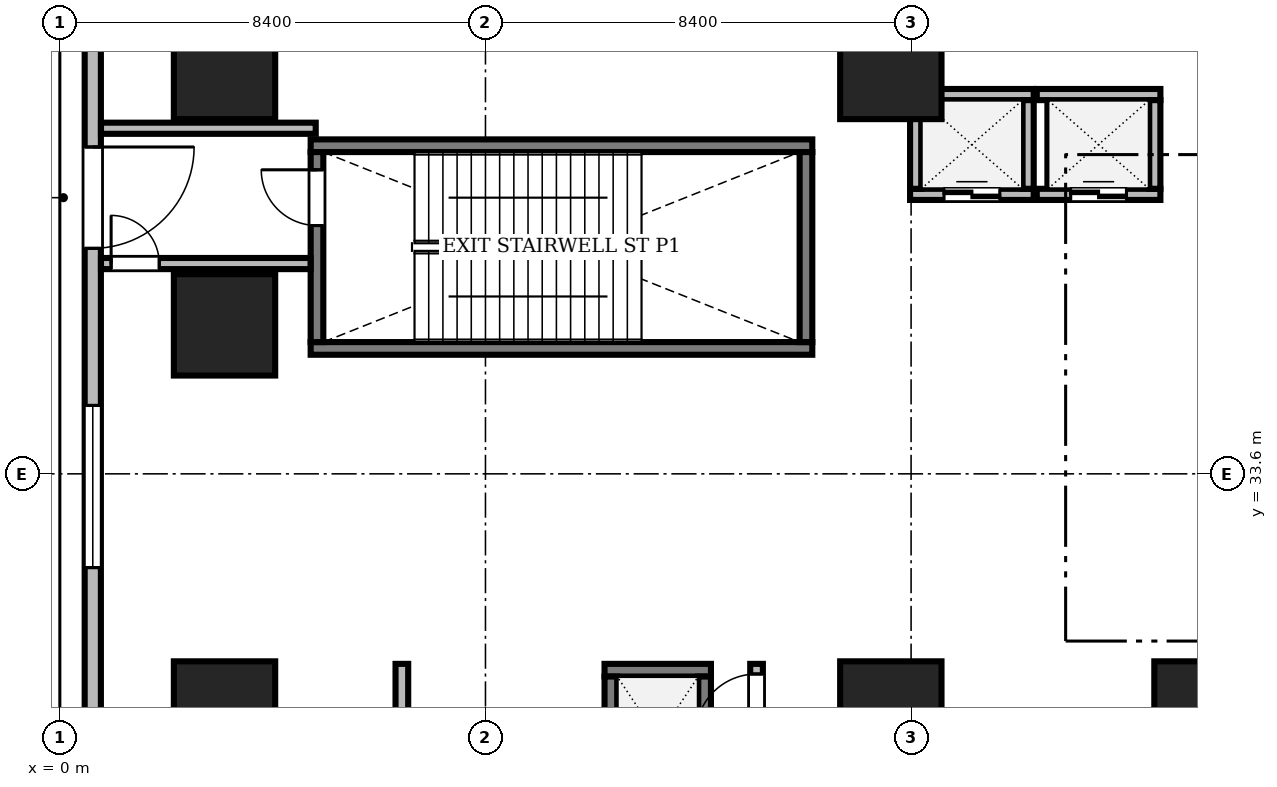
"""IFC4 building model, lengths in metres.
Left out: names, types, materials, properties, quantities, classifications, styles, units other than length and angle.
Written with IfcOpenShell. Run it as: python <this file> out.ifc"""

import sys

from ifc_helpers import new_model, si_unit, direction, frame, frame_2d, origin, origin_2d, place, context, subcontext, project, spatial, rectangle, extrude, source, transform, mapped, element, fill, save


model = new_model("IFC4")
c1 = context("Model", 3, precision=1e-05, world=origin(), true_north=direction((0.0, 1.0)))
c2 = subcontext(c1, "Body", "Model", "MODEL_VIEW")
j1 = project(units=[si_unit("LENGTHUNIT", "METRE"), si_unit("PLANEANGLEUNIT", "RADIAN")], contexts=[c1])
p1 = place(None, origin())
s1 = spatial("IfcSite", under=j1, at=p1, CompositionType="ELEMENT")
p2 = place(p1, origin())
s2 = spatial("IfcBuilding", under=s1, at=p2, CompositionType="ELEMENT")
p3 = place(p2, origin())
s3 = spatial("IfcBuildingStorey", under=s2, at=p3, CompositionType="ELEMENT", Elevation=0.0)
m1 = source(origin(), c2, "Body", "SweptSolid", [
    extrude(rectangle(XDim=2.0, YDim=2.0, at=origin_2d()), origin(), (0.0, 0.0, 1.0), 5.68),
])
for number, where, z_axis, x_axis in (
    (1, (3.25, 28.9, 0.0), (0.0, 0.0, 1.0), (1.0, 0.0, 0.0)),
    (2, (16.4, 28.9, 0.0), (0.0, 0.0, 1.0), (1.0, 0.0, 0.0)),
    (3, (22.6, 28.9, 0.0), (0.0, 0.0, 1.0), (1.0, 0.0, 0.0)),
    (4, (3.25, 36.54, 0.0), (0.0, 0.0, 1.0), (1.0, 0.0, 0.0)),
    (5, (3.25, 41.6, 0.0), (0.0, 0.0, 1.0), (1.0, 0.0, 0.0)),
    (6, (16.4, 41.6, 0.0), (0.0, 0.0, 1.0), (1.0, 0.0, 0.0)),
):
    element("IfcColumn", number, at=place(p3, frame(where, z_axis=z_axis, x_axis=x_axis)), inside=s3, PredefinedType="COLUMN", context=c2, shape_type="MappedRepresentation", body=[
        mapped(m1, transform((0.0, 0.0, 0.0), scale=1.0)),
    ])
m2 = source(origin(), c2, "Body", "SweptSolid", [
    extrude(rectangle(XDim=22.15, YDim=0.32, at=frame_2d((11.075, 0.0))), origin(), (0.0, 0.0, 1.0), 5.68),
])
p4 = place(p3, frame((0.65, 49.75, 0.0), z_axis=(0.0, 0.0, 1.0), x_axis=(0.0, -1.0, 0.0)))
e7 = element("IfcWall", 7, at=p4, inside=s3, PredefinedType="SOLIDWALL", context=c2, shape_type="MappedRepresentation", body=[
    mapped(m2, transform((0.0, 0.0, 0.0), scale=1.0)),
])
m3 = source(origin(), c2, "Body", "SweptSolid", [
    extrude(rectangle(XDim=2.0, YDim=2.6, at=frame_2d((1.0, 1.3))), frame((0.0, 0.17, 0.0), z_axis=(0.0, -1.0, 0.0), x_axis=(1.0, 0.0, 0.0)), (0.0, 0.0, 1.0), 0.34),
])
p5 = place(p4, frame((3.2, 0.0, 0.0)))
e8 = element("IfcOpeningElement", 8, at=p5, cuts=e7, PredefinedType="OPENING", context=c2, shape_type="MappedRepresentation", body=[
    mapped(m3, transform((0.0, 0.0, 0.0), scale=1.0)),
])
p6 = place(p4, frame((9.7, 0.0, 0.0)))
e9 = element("IfcOpeningElement", 9, at=p6, cuts=e7, PredefinedType="OPENING", context=c2, shape_type="MappedRepresentation", body=[
    mapped(m3, transform((0.0, 0.0, 0.0), scale=1.0)),
])
m4 = source(origin(), c2, "Body", "SweptSolid", [
    extrude(rectangle(XDim=3.2, YDim=3.4, at=frame_2d((1.6, 1.7))), frame((0.0, 0.17, 0.0), z_axis=(0.0, -1.0, 0.0), x_axis=(1.0, 0.0, 0.0)), (0.0, 0.0, 1.0), 0.34),
])
p7 = place(p4, frame((14.8, 0.0, 0.85)))
e10 = element("IfcOpeningElement", 10, at=p7, cuts=e7, PredefinedType="OPENING", context=c2, shape_type="MappedRepresentation", body=[
    mapped(m4, transform((0.0, 0.0, 0.0), scale=1.0)),
])
m5 = source(origin(), c2, "Body", "SweptSolid", [
    extrude(rectangle(XDim=9.9, YDim=0.25, at=frame_2d((4.95, 0.0))), origin(), (0.0, 0.0, 1.0), 5.8),
])
for number, where, z_axis, x_axis in (
    (11, (4.95, 36.075, 0.0), (0.0, 0.0, 1.0), (1.0, 0.0, 0.0)),
    (12, (4.95, 40.075, 0.0), (0.0, 0.0, 1.0), (1.0, 0.0, 0.0)),
):
    element("IfcWall", number, at=place(p3, frame(where, z_axis=z_axis, x_axis=x_axis)), inside=s3, PredefinedType="SOLIDWALL", context=c2, shape_type="MappedRepresentation", body=[
        mapped(m5, transform((0.0, 0.0, 0.0), scale=1.0)),
    ])
m6 = source(origin(), c2, "Body", "SweptSolid", [
    extrude(rectangle(XDim=3.75, YDim=0.25, at=frame_2d((1.875, 0.0))), origin(), (0.0, 0.0, 1.0), 5.8),
])
p8 = place(p3, frame((14.725, 36.2, 0.0), z_axis=(0.0, 0.0, 1.0), x_axis=(0.0, 1.0, 0.0)))
e13 = element("IfcWall", 13, at=p8, inside=s3, PredefinedType="SOLIDWALL", context=c2, shape_type="MappedRepresentation", body=[
    mapped(m6, transform((0.0, 0.0, 0.0), scale=1.0)),
])
p9 = place(p3, frame((5.075, 36.2, 0.0), z_axis=(0.0, 0.0, 1.0), x_axis=(0.0, 1.0, 0.0)))
e14 = element("IfcWall", 14, at=p9, inside=s3, PredefinedType="SOLIDWALL", context=c2, shape_type="MappedRepresentation", body=[
    mapped(m6, transform((0.0, 0.0, 0.0), scale=1.0)),
])
m7 = source(origin(), c2, "Body", "SweptSolid", [
    extrude(rectangle(XDim=1.1, YDim=2.2, at=frame_2d((0.55, 1.1))), frame((0.0, 0.135, 0.0), z_axis=(0.0, -1.0, 0.0), x_axis=(1.0, 0.0, 0.0)), (0.0, 0.0, 1.0), 0.27),
])
p10 = place(p9, frame((2.3, 0.0, 0.0)))
e15 = element("IfcOpeningElement", 15, at=p10, cuts=e14, PredefinedType="OPENING", context=c2, shape_type="MappedRepresentation", body=[
    mapped(m7, transform((0.0, 0.0, 0.0), scale=1.0)),
])
m8 = source(origin(), c2, "Body", "SweptSolid", [
    extrude(rectangle(XDim=2.1, YDim=0.25, at=frame_2d((1.05, 0.0))), origin(), (0.0, 0.0, 1.0), 5.68),
])
p11 = place(p3, frame((10.75, 29.725, 0.0), z_axis=(0.0, 0.0, 1.0), x_axis=(1.0, 0.0, 0.0)))
e16 = element("IfcWall", 16, at=p11, inside=s3, PredefinedType="SOLIDWALL", context=c2, shape_type="MappedRepresentation", body=[
    mapped(m8, transform((0.0, 0.0, 0.0), scale=1.0)),
])
m9 = source(origin(), c2, "Body", "SweptSolid", [
    extrude(rectangle(XDim=2.4, YDim=0.25, at=frame_2d((1.2, 0.0))), origin(), (0.0, 0.0, 1.0), 5.68),
])
for number, where, z_axis, x_axis in (
    (17, (10.875, 27.2, 0.0), (0.0, 0.0, 1.0), (0.0, 1.0, 0.0)),
    (18, (12.725, 27.2, 0.0), (0.0, 0.0, 1.0), (0.0, 1.0, 0.0)),
):
    element("IfcWall", number, at=place(p3, frame(where, z_axis=z_axis, x_axis=x_axis)), inside=s3, PredefinedType="SOLIDWALL", context=c2, shape_type="MappedRepresentation", body=[
        mapped(m9, transform((0.0, 0.0, 0.0), scale=1.0)),
    ])
m10 = source(origin(), c2, "Body", "SweptSolid", [
    extrude(rectangle(XDim=2.44, YDim=0.22, at=frame_2d((1.22, 0.0))), origin(), (0.0, 0.0, 1.0), 5.68),
])
p12 = place(p3, frame((16.78, 39.115, 0.0), z_axis=(0.0, 0.0, 1.0), x_axis=(1.0, 0.0, 0.0)))
e19 = element("IfcWall", 19, at=p12, inside=s3, PredefinedType="SOLIDWALL", context=c2, shape_type="MappedRepresentation", body=[
    mapped(m10, transform((0.0, 0.0, 0.0), scale=1.0)),
])
m11 = source(origin(), c2, "Body", "SweptSolid", [
    extrude(rectangle(XDim=1.1, YDim=2.2, at=frame_2d((0.55, 1.1))), frame((0.0, 0.12, 0.0), z_axis=(0.0, -1.0, 0.0), x_axis=(1.0, 0.0, 0.0)), (0.0, 0.0, 1.0), 0.24),
])
p13 = place(p12, frame((0.67, 0.0, 0.0)))
e20 = element("IfcOpeningElement", 20, at=p13, cuts=e19, PredefinedType="OPENING", context=c2, shape_type="MappedRepresentation", body=[
    mapped(m11, transform((0.0, 0.0, 0.0), scale=1.0)),
])
p14 = place(p3, frame((16.78, 41.085, 0.0), z_axis=(0.0, 0.0, 1.0), x_axis=(1.0, 0.0, 0.0)))
e21 = element("IfcWall", 21, at=p14, inside=s3, PredefinedType="SOLIDWALL", context=c2, shape_type="MappedRepresentation", body=[
    mapped(m10, transform((0.0, 0.0, 0.0), scale=1.0)),
])
m12 = source(origin(), c2, "Body", "SweptSolid", [
    extrude(rectangle(XDim=1.75, YDim=0.22, at=frame_2d((0.875, 0.0))), origin(), (0.0, 0.0, 1.0), 5.68),
])
for number, where, z_axis, x_axis in (
    (22, (16.89, 39.225, 0.0), (0.0, 0.0, 1.0), (0.0, 1.0, 0.0)),
    (23, (19.11, 39.225, 0.0), (0.0, 0.0, 1.0), (0.0, 1.0, 0.0)),
):
    element("IfcWall", number, at=place(p3, frame(where, z_axis=z_axis, x_axis=x_axis)), inside=s3, PredefinedType="SOLIDWALL", context=c2, shape_type="MappedRepresentation", body=[
        mapped(m12, transform((0.0, 0.0, 0.0), scale=1.0)),
    ])
p15 = place(p3, frame((19.28, 39.115, 0.0), z_axis=(0.0, 0.0, 1.0), x_axis=(1.0, 0.0, 0.0)))
e24 = element("IfcWall", 24, at=p15, inside=s3, PredefinedType="SOLIDWALL", context=c2, shape_type="MappedRepresentation", body=[
    mapped(m10, transform((0.0, 0.0, 0.0), scale=1.0)),
])
p16 = place(p15, frame((0.67, 0.0, 0.0)))
e25 = element("IfcOpeningElement", 25, at=p16, cuts=e24, PredefinedType="OPENING", context=c2, shape_type="MappedRepresentation", body=[
    mapped(m11, transform((0.0, 0.0, 0.0), scale=1.0)),
])
p17 = place(p3, frame((19.28, 41.085, 0.0), z_axis=(0.0, 0.0, 1.0), x_axis=(1.0, 0.0, 0.0)))
e26 = element("IfcWall", 26, at=p17, inside=s3, PredefinedType="SOLIDWALL", context=c2, shape_type="MappedRepresentation", body=[
    mapped(m10, transform((0.0, 0.0, 0.0), scale=1.0)),
])
p18 = place(p3, frame((21.61, 39.225, 0.0), z_axis=(0.0, 0.0, 1.0), x_axis=(0.0, 1.0, 0.0)))
e27 = element("IfcWall", 27, at=p18, inside=s3, PredefinedType="SOLIDWALL", context=c2, shape_type="MappedRepresentation", body=[
    mapped(m12, transform((0.0, 0.0, 0.0), scale=1.0)),
])
m13 = source(origin(), c2, "Body", "SweptSolid", [
    extrude(rectangle(XDim=4.136, YDim=0.22, at=frame_2d((2.068, 0.0))), origin(), (0.0, 0.0, 1.0), 5.072),
])
p19 = place(p3, frame((0.812, 37.75, 0.0), z_axis=(0.0, 0.0, 1.0), x_axis=(1.0, 0.0, 0.0)))
e28 = element("IfcWall", 28, at=p19, inside=s3, PredefinedType="SOLIDWALL", context=c2, shape_type="MappedRepresentation", body=[
    mapped(m13, transform((0.0, 0.0, 0.0), scale=1.0)),
])
m14 = source(origin(), c2, "Body", "SweptSolid", [
    extrude(rectangle(XDim=0.95, YDim=2.15, at=frame_2d((0.475, 1.075))), frame((0.0, 0.12, 0.0), z_axis=(0.0, -1.0, 0.0), x_axis=(1.0, 0.0, 0.0)), (0.0, 0.0, 1.0), 0.24),
])
p20 = place(p19, frame((0.2, 0.0, 0.0)))
e29 = element("IfcOpeningElement", 29, at=p20, cuts=e28, PredefinedType="OPENING", context=c2, shape_type="MappedRepresentation", body=[
    mapped(m14, transform((0.0, 0.0, 0.0), scale=1.0)),
])
m15 = source(origin(), c2, "Body", "SweptSolid", [
    extrude(rectangle(XDim=2.3, YDim=0.25, at=frame_2d((1.15, 0.0))), origin(), (0.0, 0.0, 1.0), 5.68),
])
p21 = place(p3, frame((13.75, 27.55, 0.0), z_axis=(0.0, 0.0, 1.0), x_axis=(0.0, 1.0, 0.0)))
e30 = element("IfcWall", 30, at=p21, inside=s3, PredefinedType="SOLIDWALL", context=c2, shape_type="MappedRepresentation", body=[
    mapped(m15, transform((0.0, 0.0, 0.0), scale=1.0)),
])
m16 = source(origin(), c2, "Body", "SweptSolid", [
    extrude(rectangle(XDim=1.2, YDim=2.2, at=frame_2d((0.6, 1.1))), frame((0.0, 0.135, 0.0), z_axis=(0.0, -1.0, 0.0), x_axis=(1.0, 0.0, 0.0)), (0.0, 0.0, 1.0), 0.27),
])
p22 = place(p21, frame((0.9, 0.0, 0.0)))
e31 = element("IfcOpeningElement", 31, at=p22, cuts=e30, PredefinedType="OPENING", context=c2, shape_type="MappedRepresentation", body=[
    mapped(m16, transform((0.0, 0.0, 0.0), scale=1.0)),
])
m17 = source(origin(), c2, "Body", "SweptSolid", [
    extrude(rectangle(XDim=4.238, YDim=0.22, at=frame_2d((2.119, 0.0))), origin(), (0.0, 0.0, 1.0), 5.072),
])
p23 = place(p3, frame((0.812, 40.42, 0.0), z_axis=(0.0, 0.0, 1.0), x_axis=(1.0, 0.0, 0.0)))
e32 = element("IfcWall", 32, at=p23, inside=s3, PredefinedType="SOLIDWALL", context=c2, shape_type="MappedRepresentation", body=[
    mapped(m17, transform((0.0, 0.0, 0.0), scale=1.0)),
])
p24 = place(p3, frame((6.75, 27.55, 0.0), z_axis=(0.0, 0.0, 1.0), x_axis=(0.0, 1.0, 0.0)))
e33 = element("IfcWall", 33, at=p24, inside=s3, PredefinedType="SOLIDWALL", context=c2, shape_type="MappedRepresentation", body=[
    mapped(m15, transform((0.0, 0.0, 0.0), scale=1.0)),
])
m18 = source(origin(), c2, "Body", "SweptSolid", [
    extrude(rectangle(XDim=2.0, YDim=2.6, at=frame_2d((1.0, 1.3))), frame((0.0, 0.025, 0.0), z_axis=(0.0, -1.0, 0.0), x_axis=(1.0, 0.0, 0.0)), (0.0, 0.0, 1.0), 0.05),
])
p25 = place(p6, frame((2.0, 0.0, 0.0), z_axis=(0.0, 0.0, 1.0), x_axis=(-1.0, 0.0, 0.0)))
e34 = element("IfcDoor", 34, at=p25, inside=s3, OperationType="DOUBLE_DOOR_SINGLE_SWING", PredefinedType="DOOR", context=c2, shape_type="MappedRepresentation", body=[
    mapped(m18, transform((0.0, 0.0, 0.0), scale=1.0)),
])
fill(e9, e34)
m19 = source(origin(), c2, "Body", "SweptSolid", [
    extrude(rectangle(XDim=3.2, YDim=3.4, at=frame_2d((1.6, 1.7))), frame((0.0, 0.03, 0.0), z_axis=(0.0, -1.0, 0.0), x_axis=(1.0, 0.0, 0.0)), (0.0, 0.0, 1.0), 0.06),
])
p26 = place(p7, origin())
e35 = element("IfcWindow", 35, at=p26, inside=s3, PartitioningType="SINGLE_PANEL", PredefinedType="WINDOW", context=c2, shape_type="MappedRepresentation", body=[
    mapped(m19, transform((0.0, 0.0, 0.0), scale=1.0)),
])
fill(e10, e35)
m20 = source(origin(), c2, "Body", "SweptSolid", [
    extrude(rectangle(XDim=1.1, YDim=2.2, at=frame_2d((0.55, 1.1))), frame((0.0, 0.025, 0.0), z_axis=(0.0, -1.0, 0.0), x_axis=(1.0, 0.0, 0.0)), (0.0, 0.0, 1.0), 0.05),
])
p27 = place(p10, origin())
e36 = element("IfcDoor", 36, at=p27, inside=s3, OperationType="SINGLE_SWING_RIGHT", PredefinedType="DOOR", context=c2, shape_type="MappedRepresentation", body=[
    mapped(m20, transform((0.0, 0.0, 0.0), scale=1.0)),
])
fill(e15, e36)
p28 = place(p13, origin())
e37 = element("IfcDoor", 37, at=p28, inside=s3, OperationType="DOUBLE_DOOR_SLIDING", PredefinedType="DOOR", context=c2, shape_type="MappedRepresentation", body=[
    mapped(m20, transform((0.0, 0.0, 0.0), scale=1.0)),
])
fill(e20, e37)
p29 = place(p16, origin())
e38 = element("IfcDoor", 38, at=p29, inside=s3, OperationType="DOUBLE_DOOR_SLIDING", PredefinedType="DOOR", context=c2, shape_type="MappedRepresentation", body=[
    mapped(m20, transform((0.0, 0.0, 0.0), scale=1.0)),
])
fill(e25, e38)
m21 = source(origin(), c2, "Body", "SweptSolid", [
    extrude(rectangle(XDim=0.95, YDim=2.15, at=frame_2d((0.475, 1.075))), frame((0.0, 0.025, 0.0), z_axis=(0.0, -1.0, 0.0), x_axis=(1.0, 0.0, 0.0)), (0.0, 0.0, 1.0), 0.05),
])
p30 = place(p20, origin())
e39 = element("IfcDoor", 39, at=p30, inside=s3, OperationType="SINGLE_SWING_LEFT", PredefinedType="DOOR", context=c2, shape_type="MappedRepresentation", body=[
    mapped(m21, transform((0.0, 0.0, 0.0), scale=1.0)),
])
fill(e29, e39)
m22 = source(origin(), c2, "Body", "SweptSolid", [
    extrude(rectangle(XDim=1.2, YDim=2.2, at=frame_2d((0.6, 1.1))), frame((0.0, 0.025, 0.0), z_axis=(0.0, -1.0, 0.0), x_axis=(1.0, 0.0, 0.0)), (0.0, 0.0, 1.0), 0.05),
])
p31 = place(p22, origin())
e40 = element("IfcDoor", 40, at=p31, inside=s3, OperationType="SINGLE_SWING_LEFT", PredefinedType="DOOR", context=c2, shape_type="MappedRepresentation", body=[
    mapped(m22, transform((0.0, 0.0, 0.0), scale=1.0)),
])
fill(e31, e40)
save(model, sys.argv[1])
